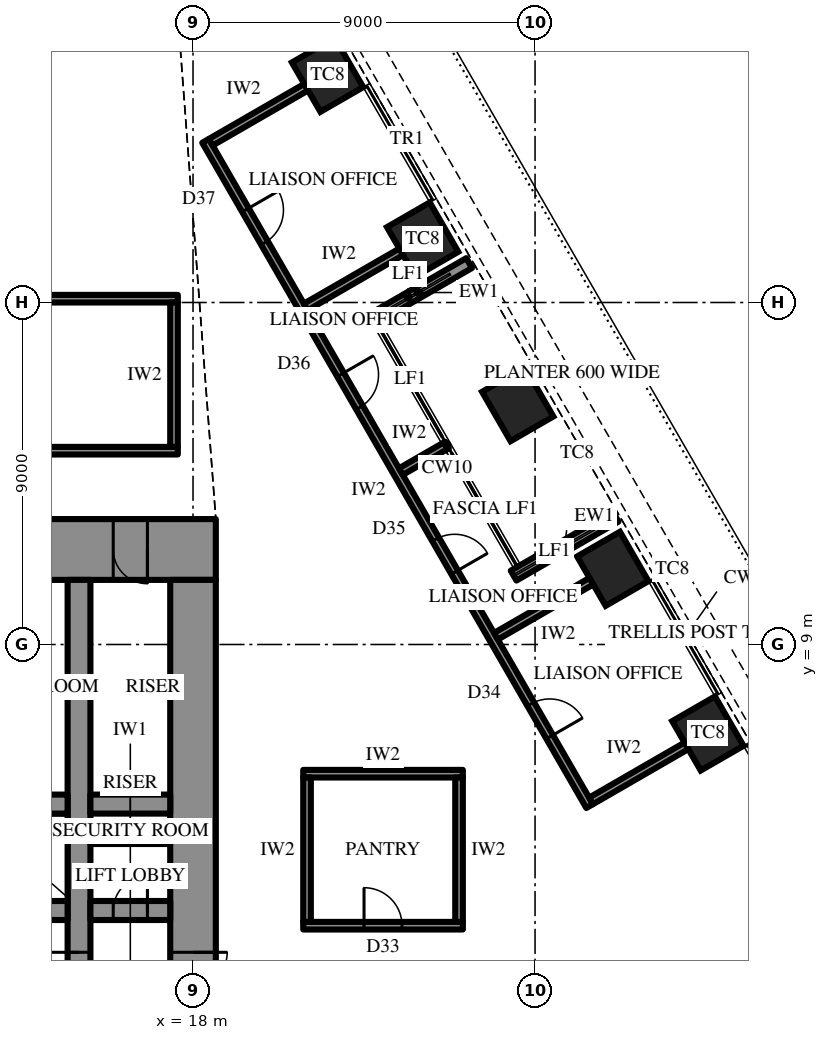
"""IFC4 building model, lengths in metres.
Left out: names, types, materials, properties, quantities, classifications, styles, units other than length and angle.
Written with IfcOpenShell. Run it as: python <this file> out.ifc"""

import sys

from ifc_helpers import new_model, si_unit, direction, frame, frame_2d, origin, origin_2d, place, context, subcontext, project, spatial, rectangle, extrude, element, fill, save


model = new_model("IFC4")
c1 = context("Model", 3, precision=1e-05, world=origin(), true_north=direction((0.0, 1.0)))
c2 = subcontext(c1, "Body", "Model", "MODEL_VIEW")
j1 = project(units=[si_unit("LENGTHUNIT", "METRE"), si_unit("PLANEANGLEUNIT", "RADIAN")], contexts=[c1])
p1 = place(None, origin())
s1 = spatial("IfcSite", under=j1, at=p1, CompositionType="ELEMENT")
p2 = place(p1, origin())
s2 = spatial("IfcBuilding", under=s1, at=p2, CompositionType="ELEMENT")
p3 = place(p2, frame((0.0, 0.0, 190.9)))
s3 = spatial("IfcBuildingStorey", under=s2, at=p3, CompositionType="ELEMENT", Elevation=190.9)
for number, where, z_axis, x_axis in (
    (1, (31.547, 6.658, 0.0), (0.0, 0.0, 1.0), (-0.5, 0.866, 0.0)),
    (2, (29.045, 10.992, 0.0), (0.0, 0.0, 1.0), (-0.5, 0.866, 0.0)),
    (3, (26.544, 15.325, 0.0), (0.0, 0.0, 1.0), (-0.5, 0.866, 0.0)),
    (4, (24.042, 19.658, 0.0), (0.0, 0.0, 1.0), (-0.5, 0.866, 0.0)),
    (5, (21.54, 23.992, 0.0), (0.0, 0.0, 1.0), (-0.5, 0.866, 0.0)),
):
    element("IfcColumn", number, at=place(p3, frame(where, z_axis=z_axis, x_axis=x_axis)), inside=s3, PredefinedType="COLUMN", context=c2, shape_type="SweptSolid", body=[
        extrude(rectangle(XDim=1.5, YDim=1.3, at=origin_2d()), origin(), (0.0, 0.0, 1.0), 4.2),
    ])
p4 = place(p3, frame((-18.6, 11.5, 0.0), z_axis=(0.0, 0.0, 1.0), x_axis=(1.0, 0.0, 0.0)))
e6 = element("IfcWall", 6, at=p4, inside=s3, PredefinedType="SHEAR", context=c2, shape_type="SweptSolid", body=[
    extrude(rectangle(XDim=37.2, YDim=1.6, at=frame_2d((18.6, 0.0))), origin(), (0.0, 0.0, 1.0), 4.2),
])
p5 = place(p4, frame((19.45, 0.0, 0.0)))
e7 = element("IfcOpeningElement", 7, at=p5, cuts=e6, PredefinedType="OPENING", context=c2, shape_type="SweptSolid", body=[
    extrude(rectangle(XDim=0.9, YDim=2.2, at=frame_2d((0.45, 1.1))), frame((0.0, 0.81, 0.0), z_axis=(0.0, -1.0, 0.0), x_axis=(1.0, 0.0, 0.0)), (0.0, 0.0, 1.0), 1.62),
])
p6 = place(p4, frame((22.45, 0.0, 0.0)))
e8 = element("IfcOpeningElement", 8, at=p6, cuts=e6, PredefinedType="OPENING", context=c2, shape_type="SweptSolid", body=[
    extrude(rectangle(XDim=0.9, YDim=2.2, at=frame_2d((0.45, 1.1))), frame((0.0, 0.81, 0.0), z_axis=(0.0, -1.0, 0.0), x_axis=(1.0, 0.0, 0.0)), (0.0, 0.0, 1.0), 1.62),
])
p7 = place(p4, frame((25.5, 0.0, 0.0)))
e9 = element("IfcOpeningElement", 9, at=p7, cuts=e6, PredefinedType="OPENING", context=c2, shape_type="SweptSolid", body=[
    extrude(rectangle(XDim=1.0, YDim=2.2, at=frame_2d((0.5, 1.1))), frame((0.0, 0.81, 0.0), z_axis=(0.0, -1.0, 0.0), x_axis=(1.0, 0.0, 0.0)), (0.0, 0.0, 1.0), 1.62),
])
p8 = place(p4, frame((1.8, 0.0, 0.0)))
e10 = element("IfcOpeningElement", 10, at=p8, cuts=e6, PredefinedType="OPENING", context=c2, shape_type="SweptSolid", body=[
    extrude(rectangle(XDim=0.9, YDim=2.2, at=frame_2d((0.45, 1.1))), frame((0.0, 0.81, 0.0), z_axis=(0.0, -1.0, 0.0), x_axis=(1.0, 0.0, 0.0)), (0.0, 0.0, 1.0), 1.62),
])
p9 = place(p4, frame((4.65, 0.0, 0.0)))
e11 = element("IfcOpeningElement", 11, at=p9, cuts=e6, PredefinedType="OPENING", context=c2, shape_type="SweptSolid", body=[
    extrude(rectangle(XDim=0.9, YDim=2.2, at=frame_2d((0.45, 1.1))), frame((0.0, 0.81, 0.0), z_axis=(0.0, -1.0, 0.0), x_axis=(1.0, 0.0, 0.0)), (0.0, 0.0, 1.0), 1.62),
])
p10 = place(p4, frame((7.75, 0.0, 0.0)))
e12 = element("IfcOpeningElement", 12, at=p10, cuts=e6, PredefinedType="OPENING", context=c2, shape_type="SweptSolid", body=[
    extrude(rectangle(XDim=0.9, YDim=2.2, at=frame_2d((0.45, 1.1))), frame((0.0, 0.81, 0.0), z_axis=(0.0, -1.0, 0.0), x_axis=(1.0, 0.0, 0.0)), (0.0, 0.0, 1.0), 1.62),
])
p11 = place(p4, frame((28.55, 0.0, 0.0)))
e13 = element("IfcOpeningElement", 13, at=p11, cuts=e6, PredefinedType="OPENING", context=c2, shape_type="SweptSolid", body=[
    extrude(rectangle(XDim=0.9, YDim=2.2, at=frame_2d((0.45, 1.1))), frame((0.0, 0.81, 0.0), z_axis=(0.0, -1.0, 0.0), x_axis=(1.0, 0.0, 0.0)), (0.0, 0.0, 1.0), 1.62),
])
p12 = place(p4, frame((31.65, 0.0, 0.0)))
e14 = element("IfcOpeningElement", 14, at=p12, cuts=e6, PredefinedType="OPENING", context=c2, shape_type="SweptSolid", body=[
    extrude(rectangle(XDim=0.9, YDim=2.2, at=frame_2d((0.45, 1.1))), frame((0.0, 0.81, 0.0), z_axis=(0.0, -1.0, 0.0), x_axis=(1.0, 0.0, 0.0)), (0.0, 0.0, 1.0), 1.62),
])
p13 = place(p4, frame((34.5, 0.0, 0.0)))
e15 = element("IfcOpeningElement", 15, at=p13, cuts=e6, PredefinedType="OPENING", context=c2, shape_type="SweptSolid", body=[
    extrude(rectangle(XDim=0.9, YDim=2.2, at=frame_2d((0.45, 1.1))), frame((0.0, 0.81, 0.0), z_axis=(0.0, -1.0, 0.0), x_axis=(1.0, 0.0, 0.0)), (0.0, 0.0, 1.0), 1.62),
])
p14 = place(p3, frame((18.0, -10.7, 0.0), z_axis=(0.0, 0.0, 1.0), x_axis=(0.0, 1.0, 0.0)))
e16 = element("IfcWall", 16, at=p14, inside=s3, PredefinedType="SHEAR", context=c2, shape_type="SweptSolid", body=[
    extrude(rectangle(XDim=21.4, YDim=1.2, at=frame_2d((10.7, 0.0))), origin(), (0.0, 0.0, 1.0), 4.2),
])
p15 = place(p14, frame((9.8, 0.0, 0.0)))
e17 = element("IfcOpeningElement", 17, at=p15, cuts=e16, PredefinedType="OPENING", context=c2, shape_type="SweptSolid", body=[
    extrude(rectangle(XDim=1.8, YDim=2.4, at=frame_2d((0.9, 1.2))), frame((0.0, 0.61, 0.0), z_axis=(0.0, -1.0, 0.0), x_axis=(1.0, 0.0, 0.0)), (0.0, 0.0, 1.0), 1.22),
])
p16 = place(p3, frame((15.0, -10.7, 0.0), z_axis=(0.0, 0.0, 1.0), x_axis=(0.0, 1.0, 0.0)))
e18 = element("IfcWall", 18, at=p16, inside=s3, PredefinedType="SHEAR", context=c2, shape_type="SweptSolid", body=[
    extrude(rectangle(XDim=21.4, YDim=0.6, at=frame_2d((10.7, 0.0))), origin(), (0.0, 0.0, 1.0), 4.2),
])
p17 = place(p16, frame((9.8, 0.0, 0.0)))
e19 = element("IfcOpeningElement", 19, at=p17, cuts=e18, PredefinedType="OPENING", context=c2, shape_type="SweptSolid", body=[
    extrude(rectangle(XDim=1.8, YDim=2.4, at=frame_2d((0.9, 1.2))), frame((0.0, 0.31, 0.0), z_axis=(0.0, -1.0, 0.0), x_axis=(1.0, 0.0, 0.0)), (0.0, 0.0, 1.0), 0.62),
])
p18 = place(p3, frame((12.3, 2.0, 0.0), z_axis=(0.0, 0.0, 1.0), x_axis=(1.0, 0.0, 0.0)))
e20 = element("IfcWall", 20, at=p18, inside=s3, PredefinedType="SHEAR", context=c2, shape_type="SweptSolid", body=[
    extrude(rectangle(XDim=2.4, YDim=0.5, at=frame_2d((1.2, 0.0))), origin(), (0.0, 0.0, 1.0), 4.2),
])
p19 = place(p3, frame((15.3, 2.0, 0.0), z_axis=(0.0, 0.0, 1.0), x_axis=(1.0, 0.0, 0.0)))
e21 = element("IfcWall", 21, at=p19, inside=s3, PredefinedType="SHEAR", context=c2, shape_type="SweptSolid", body=[
    extrude(rectangle(XDim=2.1, YDim=0.5, at=frame_2d((1.05, 0.0))), origin(), (0.0, 0.0, 1.0), 4.2),
])
p20 = place(p19, frame((0.6, 0.0, 0.0)))
e22 = element("IfcOpeningElement", 22, at=p20, cuts=e21, PredefinedType="OPENING", context=c2, shape_type="SweptSolid", body=[
    extrude(rectangle(XDim=0.9, YDim=2.2, at=frame_2d((0.45, 1.1))), frame((0.0, 0.26, 0.0), z_axis=(0.0, -1.0, 0.0), x_axis=(1.0, 0.0, 0.0)), (0.0, 0.0, 1.0), 0.52),
])
p21 = place(p3, frame((12.3, 4.8, 0.0), z_axis=(0.0, 0.0, 1.0), x_axis=(1.0, 0.0, 0.0)))
e23 = element("IfcWall", 23, at=p21, inside=s3, PredefinedType="SHEAR", context=c2, shape_type="SweptSolid", body=[
    extrude(rectangle(XDim=2.4, YDim=0.5, at=frame_2d((1.2, 0.0))), origin(), (0.0, 0.0, 1.0), 4.2),
])
p22 = place(p3, frame((15.3, 4.8, 0.0), z_axis=(0.0, 0.0, 1.0), x_axis=(1.0, 0.0, 0.0)))
e24 = element("IfcWall", 24, at=p22, inside=s3, PredefinedType="SHEAR", context=c2, shape_type="SweptSolid", body=[
    extrude(rectangle(XDim=2.1, YDim=0.5, at=frame_2d((1.05, 0.0))), origin(), (0.0, 0.0, 1.0), 4.2),
])
p23 = place(p3, frame((29.12, 12.363, 0.0), z_axis=(0.0, 0.0, 1.0), x_axis=(-0.86602952684, -0.49999285859, 0.0)))
e25 = element("IfcWall", 25, at=p23, inside=s3, PredefinedType="SOLIDWALL", context=c2, shape_type="SweptSolid", body=[
    extrude(rectangle(XDim=3.1, YDim=0.3, at=frame_2d((1.55, 0.0))), origin(), (0.0, 0.0, 1.0), 2.75),
])
p24 = place(p3, frame((25.266, 19.037, 0.0), z_axis=(0.0, 0.0, 1.0), x_axis=(-0.86600983753, -0.500026960575, 0.0)))
e26 = element("IfcWall", 26, at=p24, inside=s3, PredefinedType="SOLIDWALL", context=c2, shape_type="SweptSolid", body=[
    extrude(rectangle(XDim=3.1, YDim=0.3, at=frame_2d((1.55, 0.0))), origin(), (0.0, 0.0, 1.0), 2.75),
])
p25 = place(p3, frame((15.3, 3.85, 0.0), z_axis=(0.0, 0.0, 1.0), x_axis=(1.0, 0.0, 0.0)))
e27 = element("IfcWall", 27, at=p25, inside=s3, PredefinedType="PARTITIONING", context=c2, shape_type="SweptSolid", body=[
    extrude(rectangle(XDim=2.1, YDim=0.2, at=frame_2d((1.05, 0.0))), origin(), (0.0, 0.0, 1.0), 4.0),
])
p26 = place(p3, frame((-17.6, 14.1, 0.0), z_axis=(0.0, 0.0, 1.0), x_axis=(1.0, 0.0, 0.0)))
e28 = element("IfcWall", 28, at=p26, inside=s3, PredefinedType="PARTITIONING", context=c2, shape_type="SweptSolid", body=[
    extrude(rectangle(XDim=35.2, YDim=0.2, at=frame_2d((17.6, 0.0))), origin(), (0.0, 0.0, 1.0), 4.0),
])
p27 = place(p3, frame((-17.6, 18.1, 0.0), z_axis=(0.0, 0.0, 1.0), x_axis=(1.0, 0.0, 0.0)))
e29 = element("IfcWall", 29, at=p27, inside=s3, PredefinedType="PARTITIONING", context=c2, shape_type="SweptSolid", body=[
    extrude(rectangle(XDim=35.2, YDim=0.2, at=frame_2d((17.6, 0.0))), origin(), (0.0, 0.0, 1.0), 4.0),
])
p28 = place(p27, frame((7.95, 0.0, 0.0)))
e30 = element("IfcOpeningElement", 30, at=p28, cuts=e29, PredefinedType="OPENING", context=c2, shape_type="SweptSolid", body=[
    extrude(rectangle(XDim=1.8, YDim=2.4, at=frame_2d((0.9, 1.2))), frame((0.0, 0.11, 0.0), z_axis=(0.0, -1.0, 0.0), x_axis=(1.0, 0.0, 0.0)), (0.0, 0.0, 1.0), 0.22),
])
p29 = place(p27, frame((25.45, 0.0, 0.0)))
e31 = element("IfcOpeningElement", 31, at=p29, cuts=e29, PredefinedType="OPENING", context=c2, shape_type="SweptSolid", body=[
    extrude(rectangle(XDim=1.8, YDim=2.4, at=frame_2d((0.9, 1.2))), frame((0.0, 0.11, 0.0), z_axis=(0.0, -1.0, 0.0), x_axis=(1.0, 0.0, 0.0)), (0.0, 0.0, 1.0), 0.22),
])
p30 = place(p3, frame((17.5, 14.2, 0.0), z_axis=(0.0, 0.0, 1.0), x_axis=(0.0, 1.0, 0.0)))
e32 = element("IfcWall", 32, at=p30, inside=s3, PredefinedType="PARTITIONING", context=c2, shape_type="SweptSolid", body=[
    extrude(rectangle(XDim=3.8, YDim=0.2, at=frame_2d((1.9, 0.0))), origin(), (0.0, 0.0, 1.0), 4.0),
])
p31 = place(p3, frame((28.436, 4.747, 0.0), z_axis=(0.0, 0.0, 1.0), x_axis=(-0.499995666571, 0.866027905677, 0.0)))
e33 = element("IfcWall", 33, at=p31, inside=s3, PredefinedType="PARTITIONING", context=c2, shape_type="SweptSolid", body=[
    extrude(rectangle(XDim=20.215, YDim=0.2, at=frame_2d((10.107, 0.0))), origin(), (0.0, 0.0, 1.0), 4.0),
])
p32 = place(p31, frame((2.102, 0.0, 0.0)))
e34 = element("IfcOpeningElement", 34, at=p32, cuts=e33, PredefinedType="OPENING", context=c2, shape_type="SweptSolid", body=[
    extrude(rectangle(XDim=1.0, YDim=2.2, at=frame_2d((0.5, 1.1))), frame((0.0, 0.11, 0.0), z_axis=(0.0, -1.0, 0.0), x_axis=(1.0, 0.0, 0.0)), (0.0, 0.0, 1.0), 0.22),
])
p33 = place(p31, frame((7.105, 0.0, 0.0)))
e35 = element("IfcOpeningElement", 35, at=p33, cuts=e33, PredefinedType="OPENING", context=c2, shape_type="SweptSolid", body=[
    extrude(rectangle(XDim=1.0, YDim=2.2, at=frame_2d((0.5, 1.1))), frame((0.0, 0.11, 0.0), z_axis=(0.0, -1.0, 0.0), x_axis=(1.0, 0.0, 0.0)), (0.0, 0.0, 1.0), 0.22),
])
p34 = place(p31, frame((12.109, 0.0, 0.0)))
e36 = element("IfcOpeningElement", 36, at=p34, cuts=e33, PredefinedType="OPENING", context=c2, shape_type="SweptSolid", body=[
    extrude(rectangle(XDim=1.0, YDim=2.2, at=frame_2d((0.5, 1.1))), frame((0.0, 0.11, 0.0), z_axis=(0.0, -1.0, 0.0), x_axis=(1.0, 0.0, 0.0)), (0.0, 0.0, 1.0), 0.22),
])
p35 = place(p31, frame((17.113, 0.0, 0.0)))
e37 = element("IfcOpeningElement", 37, at=p35, cuts=e33, PredefinedType="OPENING", context=c2, shape_type="SweptSolid", body=[
    extrude(rectangle(XDim=1.0, YDim=2.2, at=frame_2d((0.5, 1.1))), frame((0.0, 0.11, 0.0), z_axis=(0.0, -1.0, 0.0), x_axis=(1.0, 0.0, 0.0)), (0.0, 0.0, 1.0), 0.22),
])
p36 = place(p3, frame((28.473, 4.883, 0.0), z_axis=(0.0, 0.0, 1.0), x_axis=(0.866032775405, 0.499987231761, 0.0)))
e38 = element("IfcWall", 38, at=p36, inside=s3, PredefinedType="PARTITIONING", context=c2, shape_type="SweptSolid", body=[
    extrude(rectangle(XDim=2.9, YDim=0.2, at=frame_2d((1.45, 0.0))), origin(), (0.0, 0.0, 1.0), 3.082),
])
p37 = place(p3, frame((25.971, 9.217, 0.0), z_axis=(0.0, 0.0, 1.0), x_axis=(0.865996321171, 0.50005036918, 0.0)))
e39 = element("IfcWall", 39, at=p37, inside=s3, PredefinedType="PARTITIONING", context=c2, shape_type="SweptSolid", body=[
    extrude(rectangle(XDim=2.9, YDim=0.2, at=frame_2d((1.45, 0.0))), origin(), (0.0, 0.0, 1.0), 3.082),
])
p38 = place(p3, frame((23.469, 13.55, 0.0), z_axis=(0.0, 0.0, 1.0), x_axis=(0.866057911062, 0.499943691516, 0.0)))
e40 = element("IfcWall", 40, at=p38, inside=s3, PredefinedType="PARTITIONING", context=c2, shape_type="SweptSolid", body=[
    extrude(rectangle(XDim=1.401, YDim=0.2, at=frame_2d((0.701, 0.0))), origin(), (0.0, 0.0, 1.0), 4.0),
])
p39 = place(p3, frame((20.968, 17.883, 0.0), z_axis=(0.0, 0.0, 1.0), x_axis=(0.866032775405, 0.499987231761, 0.0)))
e41 = element("IfcWall", 41, at=p39, inside=s3, PredefinedType="PARTITIONING", context=c2, shape_type="SweptSolid", body=[
    extrude(rectangle(XDim=2.9, YDim=0.2, at=frame_2d((1.45, 0.0))), origin(), (0.0, 0.0, 1.0), 3.082),
])
p40 = place(p3, frame((18.466, 22.217, 0.0), z_axis=(0.0, 0.0, 1.0), x_axis=(0.865996321171, 0.50005036918, 0.0)))
e42 = element("IfcWall", 42, at=p40, inside=s3, PredefinedType="PARTITIONING", context=c2, shape_type="SweptSolid", body=[
    extrude(rectangle(XDim=2.9, YDim=0.2, at=frame_2d((1.45, 0.0))), origin(), (0.0, 0.0, 1.0), 3.082),
])
p41 = place(p3, frame((20.9, 1.6, 0.0), z_axis=(0.0, 0.0, 1.0), x_axis=(1.0, 0.0, 0.0)))
e43 = element("IfcWall", 43, at=p41, inside=s3, PredefinedType="PARTITIONING", context=c2, shape_type="SweptSolid", body=[
    extrude(rectangle(XDim=4.2, YDim=0.2, at=frame_2d((2.1, 0.0))), origin(), (0.0, 0.0, 1.0), 4.0),
])
p42 = place(p41, frame((1.6, 0.0, 0.0)))
e44 = element("IfcOpeningElement", 44, at=p42, cuts=e43, PredefinedType="OPENING", context=c2, shape_type="SweptSolid", body=[
    extrude(rectangle(XDim=1.0, YDim=2.2, at=frame_2d((0.5, 1.1))), frame((0.0, 0.11, 0.0), z_axis=(0.0, -1.0, 0.0), x_axis=(1.0, 0.0, 0.0)), (0.0, 0.0, 1.0), 0.22),
])
p43 = place(p3, frame((20.9, 5.6, 0.0), z_axis=(0.0, 0.0, 1.0), x_axis=(1.0, 0.0, 0.0)))
e45 = element("IfcWall", 45, at=p43, inside=s3, PredefinedType="PARTITIONING", context=c2, shape_type="SweptSolid", body=[
    extrude(rectangle(XDim=4.2, YDim=0.2, at=frame_2d((2.1, 0.0))), origin(), (0.0, 0.0, 1.0), 4.0),
])
for number, where, z_axis, x_axis in (
    (46, (21.0, 1.7, 0.0), (0.0, 0.0, 1.0), (0.0, 1.0, 0.0)),
    (47, (25.0, 1.7, 0.0), (0.0, 0.0, 1.0), (0.0, 1.0, 0.0)),
):
    element("IfcWall", number, at=place(p3, frame(where, z_axis=z_axis, x_axis=x_axis)), inside=s3, PredefinedType="PARTITIONING", context=c2, shape_type="SweptSolid", body=[
        extrude(rectangle(XDim=3.8, YDim=0.2, at=frame_2d((1.9, 0.0))), origin(), (0.0, 0.0, 1.0), 4.0),
    ])
p44 = place(p15, frame((1.8, 0.0, 0.0), z_axis=(0.0, 0.0, 1.0), x_axis=(-1.0, 0.0, 0.0)))
e48 = element("IfcDoor", 48, at=p44, inside=s3, OperationType="DOUBLE_DOOR_SINGLE_SWING", PredefinedType="DOOR", context=c2, shape_type="SweptSolid", body=[
    extrude(rectangle(XDim=1.8, YDim=2.4, at=frame_2d((0.9, 1.2))), frame((0.0, 0.025, 0.0), z_axis=(0.0, -1.0, 0.0), x_axis=(1.0, 0.0, 0.0)), (0.0, 0.0, 1.0), 0.05),
])
fill(e17, e48)
p45 = place(p13, frame((0.9, 0.0, 0.0), z_axis=(0.0, 0.0, 1.0), x_axis=(-1.0, 0.0, 0.0)))
e49 = element("IfcDoor", 49, at=p45, inside=s3, OperationType="SINGLE_SWING_RIGHT", PredefinedType="DOOR", context=c2, shape_type="SweptSolid", body=[
    extrude(rectangle(XDim=0.9, YDim=2.2, at=frame_2d((0.45, 1.1))), frame((0.0, 0.025, 0.0), z_axis=(0.0, -1.0, 0.0), x_axis=(1.0, 0.0, 0.0)), (0.0, 0.0, 1.0), 0.05),
])
fill(e15, e49)
p46 = place(p20, origin())
e50 = element("IfcDoor", 50, at=p46, inside=s3, OperationType="SINGLE_SWING_LEFT", PredefinedType="DOOR", context=c2, shape_type="SweptSolid", body=[
    extrude(rectangle(XDim=0.9, YDim=2.2, at=frame_2d((0.45, 1.1))), frame((0.0, 0.025, 0.0), z_axis=(0.0, -1.0, 0.0), x_axis=(1.0, 0.0, 0.0)), (0.0, 0.0, 1.0), 0.05),
])
fill(e22, e50)
p47 = place(p17, origin())
e51 = element("IfcDoor", 51, at=p47, inside=s3, OperationType="DOUBLE_DOOR_SINGLE_SWING", PredefinedType="DOOR", context=c2, shape_type="SweptSolid", body=[
    extrude(rectangle(XDim=1.8, YDim=2.4, at=frame_2d((0.9, 1.2))), frame((0.0, 0.025, 0.0), z_axis=(0.0, -1.0, 0.0), x_axis=(1.0, 0.0, 0.0)), (0.0, 0.0, 1.0), 0.05),
])
fill(e19, e51)
p48 = place(p32, frame((1.0, 0.0, 0.0), z_axis=(0.0, 0.0, 1.0), x_axis=(-1.0, 0.0, 0.0)))
e52 = element("IfcDoor", 52, at=p48, inside=s3, OperationType="SINGLE_SWING_LEFT", PredefinedType="DOOR", context=c2, shape_type="SweptSolid", body=[
    extrude(rectangle(XDim=1.0, YDim=2.2, at=frame_2d((0.5, 1.1))), frame((0.0, 0.025, 0.0), z_axis=(0.0, -1.0, 0.0), x_axis=(1.0, 0.0, 0.0)), (0.0, 0.0, 1.0), 0.05),
])
fill(e34, e52)
p49 = place(p33, frame((1.0, 0.0, 0.0), z_axis=(0.0, 0.0, 1.0), x_axis=(-1.0, 0.0, 0.0)))
e53 = element("IfcDoor", 53, at=p49, inside=s3, OperationType="SINGLE_SWING_LEFT", PredefinedType="DOOR", context=c2, shape_type="SweptSolid", body=[
    extrude(rectangle(XDim=1.0, YDim=2.2, at=frame_2d((0.5, 1.1))), frame((0.0, 0.025, 0.0), z_axis=(0.0, -1.0, 0.0), x_axis=(1.0, 0.0, 0.0)), (0.0, 0.0, 1.0), 0.05),
])
fill(e35, e53)
p50 = place(p34, frame((1.0, 0.0, 0.0), z_axis=(0.0, 0.0, 1.0), x_axis=(-1.0, 0.0, 0.0)))
e54 = element("IfcDoor", 54, at=p50, inside=s3, OperationType="SINGLE_SWING_RIGHT", PredefinedType="DOOR", context=c2, shape_type="SweptSolid", body=[
    extrude(rectangle(XDim=1.0, YDim=2.2, at=frame_2d((0.5, 1.1))), frame((0.0, 0.025, 0.0), z_axis=(0.0, -1.0, 0.0), x_axis=(1.0, 0.0, 0.0)), (0.0, 0.0, 1.0), 0.05),
])
fill(e36, e54)
p51 = place(p35, frame((1.0, 0.0, 0.0), z_axis=(0.0, 0.0, 1.0), x_axis=(-1.0, 0.0, 0.0)))
e55 = element("IfcDoor", 55, at=p51, inside=s3, OperationType="SINGLE_SWING_RIGHT", PredefinedType="DOOR", context=c2, shape_type="SweptSolid", body=[
    extrude(rectangle(XDim=1.0, YDim=2.2, at=frame_2d((0.5, 1.1))), frame((0.0, 0.025, 0.0), z_axis=(0.0, -1.0, 0.0), x_axis=(1.0, 0.0, 0.0)), (0.0, 0.0, 1.0), 0.05),
])
fill(e37, e55)
p52 = place(p42, origin())
e56 = element("IfcDoor", 56, at=p52, inside=s3, OperationType="SINGLE_SWING_RIGHT", PredefinedType="DOOR", context=c2, shape_type="SweptSolid", body=[
    extrude(rectangle(XDim=1.0, YDim=2.2, at=frame_2d((0.5, 1.1))), frame((0.0, 0.025, 0.0), z_axis=(0.0, -1.0, 0.0), x_axis=(1.0, 0.0, 0.0)), (0.0, 0.0, 1.0), 0.05),
])
fill(e44, e56)
save(model, sys.argv[1])
